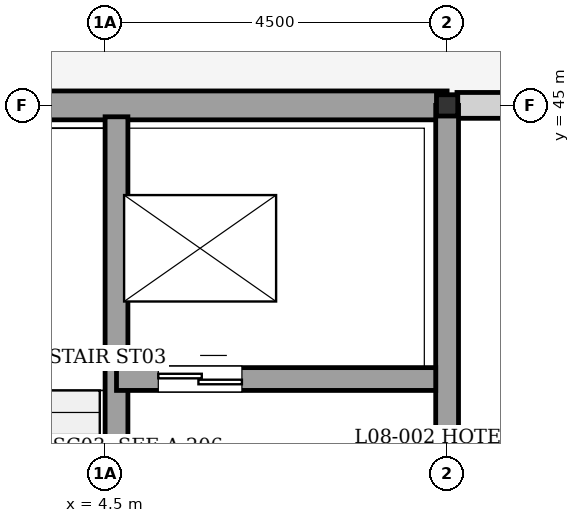
"""IFC4 building model, lengths in metres.
Left out: names, types, materials, properties, quantities, classifications, styles, units other than length and angle.
Written with IfcOpenShell. Run it as: python <this file> out.ifc"""

import sys

from ifc_helpers import new_model, si_unit, direction, frame, frame_2d, origin, origin_2d, place, context, subcontext, project, spatial, rectangle, i_section, extrude, element, fill, save


model = new_model("IFC4")
c1 = context("Model", 3, precision=1e-05, world=origin(), true_north=direction((0.0, 1.0)))
c2 = subcontext(c1, "Body", "Model", "MODEL_VIEW")
j1 = project(units=[si_unit("LENGTHUNIT", "METRE"), si_unit("PLANEANGLEUNIT", "RADIAN")], contexts=[c1])
p1 = place(None, origin())
s1 = spatial("IfcSite", under=j1, at=p1, CompositionType="ELEMENT")
p2 = place(p1, origin())
s2 = spatial("IfcBuilding", under=s1, at=p2, CompositionType="ELEMENT")
p3 = place(p2, frame((0.0, 0.0, 26.88)))
s3 = spatial("IfcBuildingStorey", under=s2, at=p3, CompositionType="ELEMENT", Elevation=26.88)
p4 = place(p3, frame((9.0, 45.0, 0.0), z_axis=(0.0, 0.0, 1.0), x_axis=(1.0, 0.0, 0.0)))
e1 = element("IfcColumn", 1, at=p4, inside=s3, PredefinedType="COLUMN", context=c2, shape_type="SweptSolid", body=[
    extrude(i_section(OverallWidth=0.28, OverallDepth=0.28, WebThickness=0.01, FlangeThickness=0.018, at=origin_2d()), origin(), (0.0, 0.0, 1.0), 3.52),
])
p5 = place(p3, frame((0.0, 45.0, 0.0), z_axis=(0.0, 0.0, 1.0), x_axis=(1.0, 0.0, 0.0)))
e2 = element("IfcWall", 2, at=p5, inside=s3, PredefinedType="SOLIDWALL", context=c2, shape_type="SweptSolid", body=[
    extrude(rectangle(XDim=9.0, YDim=0.38, at=frame_2d((4.5, 0.0))), origin(), (0.0, 0.0, 1.0), 3.27),
])
p6 = place(p3, frame((9.13, 45.0, 0.0), z_axis=(0.0, 0.0, 1.0), x_axis=(1.0, 0.0, 0.0)))
e3 = element("IfcWall", 3, at=p6, inside=s3, PredefinedType="SOLIDWALL", context=c2, shape_type="SweptSolid", body=[
    extrude(rectangle(XDim=8.87, YDim=0.34, at=frame_2d((4.435, 0.0))), origin(), (0.0, 0.0, 1.0), 2.87),
])
p7 = place(p6, frame((3.47, 0.0, 0.0)))
e4 = element("IfcOpeningElement", 4, at=p7, cuts=e3, PredefinedType="OPENING", context=c2, shape_type="SweptSolid", body=[
    extrude(rectangle(XDim=1.8, YDim=2.3, at=frame_2d((0.9, 1.15))), frame((0.0, 0.18, 0.0), z_axis=(0.0, -1.0, 0.0), x_axis=(1.0, 0.0, 0.0)), (0.0, 0.0, 1.0), 0.36),
])
p8 = place(p3, frame((9.0, 36.0, 0.0), z_axis=(0.0, 0.0, 1.0), x_axis=(0.0, 1.0, 0.0)))
e5 = element("IfcWall", 5, at=p8, inside=s3, PredefinedType="SHEAR", context=c2, shape_type="SweptSolid", body=[
    extrude(rectangle(XDim=9.0, YDim=0.3, at=frame_2d((4.5, 0.0))), origin(), (0.0, 0.0, 1.0), 3.27),
])
p9 = place(p8, frame((1.95, 0.0, 0.0)))
e6 = element("IfcOpeningElement", 6, at=p9, cuts=e5, PredefinedType="OPENING", context=c2, shape_type="SweptSolid", body=[
    extrude(rectangle(XDim=1.6, YDim=2.1, at=frame_2d((0.8, 1.05))), frame((0.0, 0.16, 0.0), z_axis=(0.0, -1.0, 0.0), x_axis=(1.0, 0.0, 0.0)), (0.0, 0.0, 1.0), 0.32),
])
p10 = place(p3, frame((4.65, 36.15, 0.0), z_axis=(0.0, 0.0, 1.0), x_axis=(0.0, 1.0, 0.0)))
e7 = element("IfcWall", 7, at=p10, inside=s3, PredefinedType="SHEAR", context=c2, shape_type="SweptSolid", body=[
    extrude(rectangle(XDim=8.7, YDim=0.3, at=frame_2d((4.35, 0.0))), origin(), (0.0, 0.0, 1.0), 3.27),
])
p11 = place(p10, frame((0.35, 0.0, 0.0)))
e8 = element("IfcOpeningElement", 8, at=p11, cuts=e7, PredefinedType="OPENING", context=c2, shape_type="SweptSolid", body=[
    extrude(rectangle(XDim=1.4, YDim=2.02, at=frame_2d((0.7, 1.01))), frame((0.0, 0.16, 0.0), z_axis=(0.0, -1.0, 0.0), x_axis=(1.0, 0.0, 0.0)), (0.0, 0.0, 1.0), 0.32),
])
p12 = place(p3, frame((4.65, 41.4, 0.0), z_axis=(0.0, 0.0, 1.0), x_axis=(1.0, 0.0, 0.0)))
e9 = element("IfcWall", 9, at=p12, inside=s3, PredefinedType="SHEAR", context=c2, shape_type="SweptSolid", body=[
    extrude(rectangle(XDim=4.2, YDim=0.3, at=frame_2d((2.1, 0.0))), origin(), (0.0, 0.0, 1.0), 3.27),
])
p13 = place(p12, frame((0.55, 0.0, 0.0)))
e10 = element("IfcOpeningElement", 10, at=p13, cuts=e9, PredefinedType="OPENING", context=c2, shape_type="SweptSolid", body=[
    extrude(rectangle(XDim=1.1, YDim=2.1, at=frame_2d((0.55, 1.05))), frame((0.0, 0.16, 0.0), z_axis=(0.0, -1.0, 0.0), x_axis=(1.0, 0.0, 0.0)), (0.0, 0.0, 1.0), 0.32),
])
p14 = place(p13, origin())
e11 = element("IfcDoor", 11, at=p14, inside=s3, OperationType="DOUBLE_DOOR_SLIDING", PredefinedType="DOOR", context=c2, shape_type="SweptSolid", body=[
    extrude(rectangle(XDim=1.1, YDim=2.1, at=frame_2d((0.55, 1.05))), frame((0.0, 0.025, 0.0), z_axis=(0.0, -1.0, 0.0), x_axis=(1.0, 0.0, 0.0)), (0.0, 0.0, 1.0), 0.05),
])
fill(e10, e11)
save(model, sys.argv[1])
